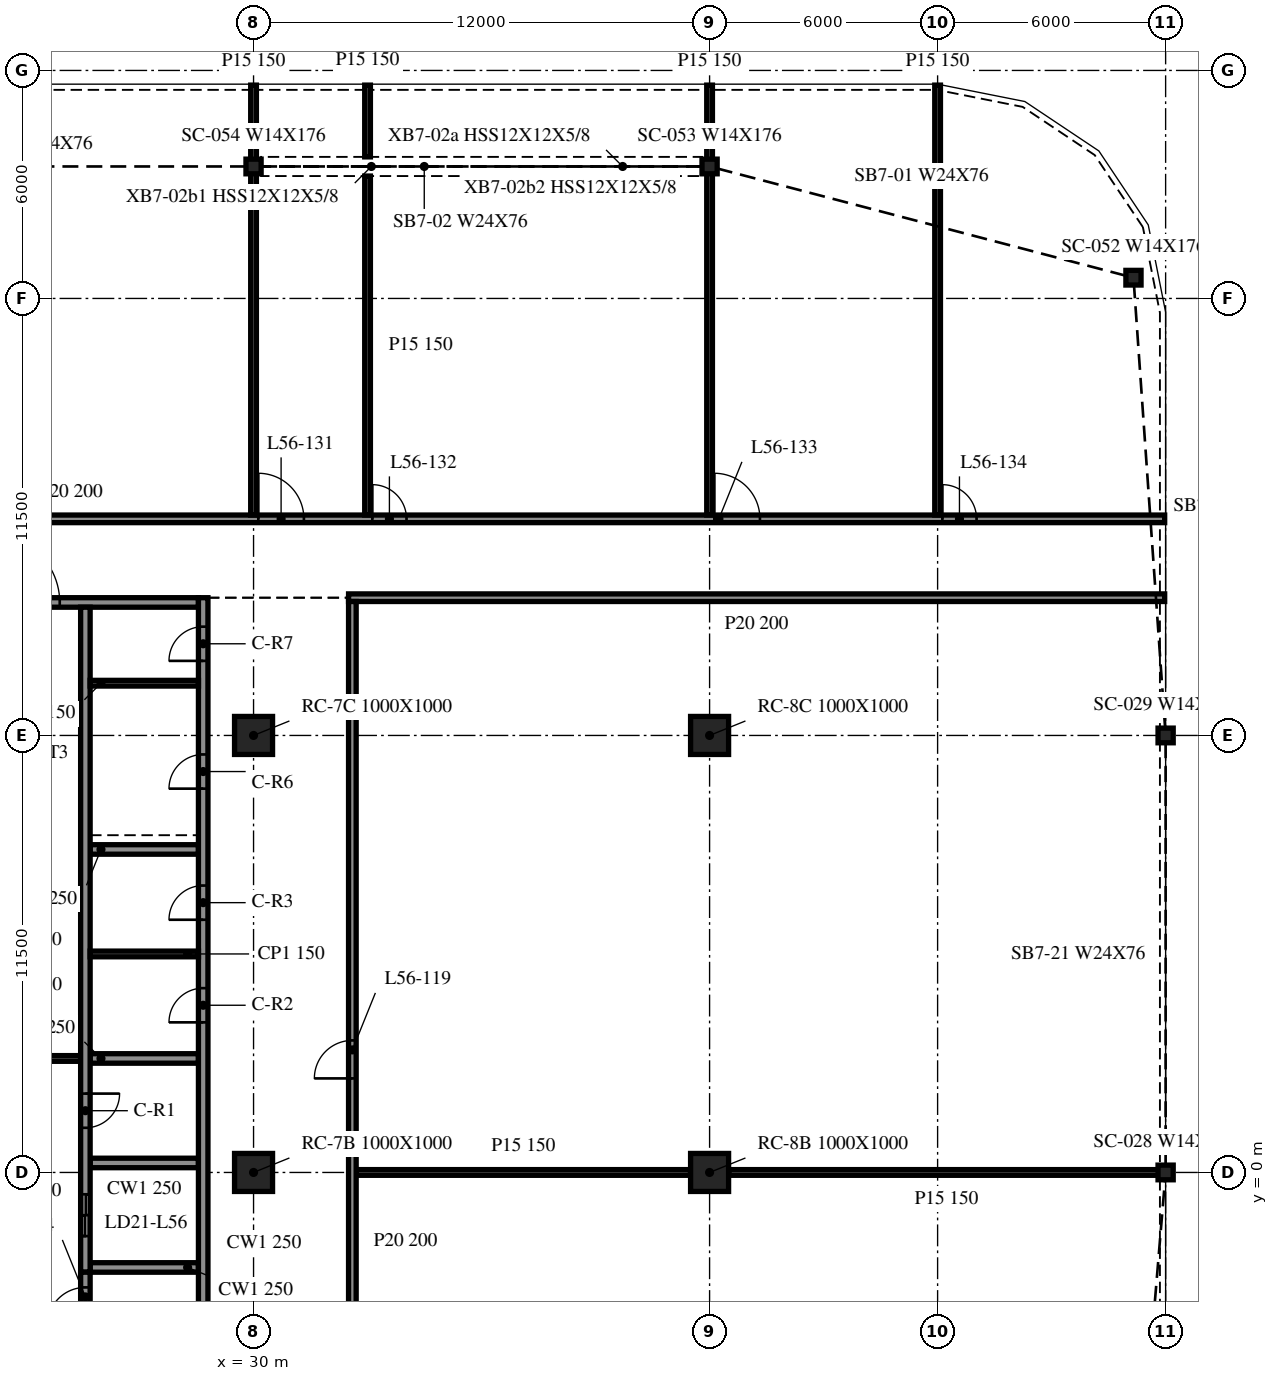
"""IFC4 building model, lengths in metres.
Left out: names, types, materials, properties, quantities, classifications, styles, units other than length and angle.
Written with IfcOpenShell. Run it as: python <this file> out.ifc"""

import sys

from ifc_helpers import new_model, si_unit, direction, frame, frame_2d, origin, origin_2d, place, context, subcontext, project, spatial, rectangle, i_section, extrude, element, fill, save


model = new_model("IFC4")
c1 = context("Model", 3, precision=1e-05, world=origin(), true_north=direction((0.0, 1.0)))
c2 = subcontext(c1, "Body", "Model", "MODEL_VIEW")
j1 = project(units=[si_unit("LENGTHUNIT", "METRE"), si_unit("PLANEANGLEUNIT", "RADIAN")], contexts=[c1])
p1 = place(None, origin())
s1 = spatial("IfcSite", under=j1, at=p1, CompositionType="ELEMENT")
p2 = place(p1, origin())
s2 = spatial("IfcBuilding", under=s1, at=p2, CompositionType="ELEMENT")
p3 = place(p2, frame((0.0, 0.0, 232.4)))
s3 = spatial("IfcBuildingStorey", under=s2, at=p3, CompositionType="ELEMENT", Elevation=232.4)
for number, where, z_axis, x_axis in (
    (1, (30.0, 0.0, -0.34), (0.0, 0.0, 1.0), (1.0, 0.0, 0.0)),
    (2, (30.0, 11.5, -0.34), (0.0, 0.0, 1.0), (1.0, 0.0, 0.0)),
    (3, (42.0, 0.0, -0.34), (0.0, 0.0, 1.0), (1.0, 0.0, 0.0)),
    (4, (42.0, 11.5, -0.34), (0.0, 0.0, 1.0), (1.0, 0.0, 0.0)),
):
    element("IfcColumn", number, at=place(p3, frame(where, z_axis=z_axis, x_axis=x_axis)), inside=s3, PredefinedType="COLUMN", context=c2, shape_type="SweptSolid", body=[
        extrude(rectangle(XDim=1.0, YDim=1.0, at=origin_2d()), origin(), (0.0, 0.0, 1.0), 3.8),
    ])
for number, where, z_axis, x_axis in (
    (5, (53.154, 23.546, -0.34), (0.0, 0.0, 1.0), (1.0, 0.0, 0.0)),
    (6, (42.0, 26.473, -0.34), (0.0, 0.0, 1.0), (1.0, 0.0, 0.0)),
    (7, (30.0, 26.473, -0.34), (0.0, 0.0, 1.0), (1.0, 0.0, 0.0)),
    (8, (54.0, 0.0, -0.34), (0.0, 0.0, 1.0), (1.0, 0.0, 0.0)),
    (9, (54.0, 11.5, -0.34), (0.0, 0.0, 1.0), (1.0, 0.0, 0.0)),
):
    element("IfcColumn", number, at=place(p3, frame(where, z_axis=z_axis, x_axis=x_axis)), inside=s3, PredefinedType="COLUMN", context=c2, shape_type="SweptSolid", body=[
        extrude(i_section(OverallWidth=0.399, OverallDepth=0.386, WebThickness=0.021, FlangeThickness=0.033, at=origin_2d()), origin(), (0.0, 0.0, 1.0), 3.8),
    ])
p4 = place(p3, frame((28.675, -9.125, 0.0), z_axis=(0.0, 0.0, 1.0), x_axis=(0.0, 1.0, 0.0)))
e10 = element("IfcWall", 10, at=p4, inside=s3, PredefinedType="SOLIDWALL", context=c2, shape_type="SweptSolid", body=[
    extrude(rectangle(XDim=24.25, YDim=0.25, at=frame_2d((12.125, 0.0))), origin(), (0.0, 0.0, 1.0), 3.46),
])
p5 = place(p4, frame((13.075, 0.0, 0.0)))
e11 = element("IfcOpeningElement", 11, at=p5, cuts=e10, PredefinedType="OPENING", context=c2, shape_type="SweptSolid", body=[
    extrude(rectangle(XDim=0.9, YDim=2.1, at=frame_2d((0.45, 1.05))), frame((0.0, 0.135, 0.0), z_axis=(0.0, -1.0, 0.0), x_axis=(1.0, 0.0, 0.0)), (0.0, 0.0, 1.0), 0.27),
])
p6 = place(p4, frame((15.775, 0.0, 0.0)))
e12 = element("IfcOpeningElement", 12, at=p6, cuts=e10, PredefinedType="OPENING", context=c2, shape_type="SweptSolid", body=[
    extrude(rectangle(XDim=0.9, YDim=2.1, at=frame_2d((0.45, 1.05))), frame((0.0, 0.135, 0.0), z_axis=(0.0, -1.0, 0.0), x_axis=(1.0, 0.0, 0.0)), (0.0, 0.0, 1.0), 0.27),
])
p7 = place(p4, frame((19.225, 0.0, 0.0)))
e13 = element("IfcOpeningElement", 13, at=p7, cuts=e10, PredefinedType="OPENING", context=c2, shape_type="SweptSolid", body=[
    extrude(rectangle(XDim=0.9, YDim=2.1, at=frame_2d((0.45, 1.05))), frame((0.0, 0.135, 0.0), z_axis=(0.0, -1.0, 0.0), x_axis=(1.0, 0.0, 0.0)), (0.0, 0.0, 1.0), 0.27),
])
p8 = place(p4, frame((22.587, 0.0, 0.0)))
e14 = element("IfcOpeningElement", 14, at=p8, cuts=e10, PredefinedType="OPENING", context=c2, shape_type="SweptSolid", body=[
    extrude(rectangle(XDim=0.9, YDim=2.1, at=frame_2d((0.45, 1.05))), frame((0.0, 0.135, 0.0), z_axis=(0.0, -1.0, 0.0), x_axis=(1.0, 0.0, 0.0)), (0.0, 0.0, 1.0), 0.27),
])
p9 = place(p3, frame((19.45, 15.0, 0.0), z_axis=(0.0, 0.0, 1.0), x_axis=(1.0, 0.0, 0.0)))
e15 = element("IfcWall", 15, at=p9, inside=s3, PredefinedType="SOLIDWALL", context=c2, shape_type="SweptSolid", body=[
    extrude(rectangle(XDim=9.1, YDim=0.25, at=frame_2d((4.55, 0.0))), origin(), (0.0, 0.0, 1.0), 3.46),
])
p10 = place(p9, frame((3.65, 0.0, 0.0)))
e16 = element("IfcOpeningElement", 16, at=p10, cuts=e15, PredefinedType="OPENING", context=c2, shape_type="SweptSolid", body=[
    extrude(rectangle(XDim=1.8, YDim=2.1, at=frame_2d((0.9, 1.05))), frame((0.0, 0.135, 0.0), z_axis=(0.0, -1.0, 0.0), x_axis=(1.0, 0.0, 0.0)), (0.0, 0.0, 1.0), 0.27),
])
p11 = place(p3, frame((25.575, -8.875, 0.0), z_axis=(0.0, 0.0, 1.0), x_axis=(0.0, 1.0, 0.0)))
e17 = element("IfcWall", 17, at=p11, inside=s3, PredefinedType="SOLIDWALL", context=c2, shape_type="SweptSolid", body=[
    extrude(rectangle(XDim=6.25, YDim=0.25, at=frame_2d((3.125, 0.0))), origin(), (0.0, 0.0, 1.0), 3.46),
])
p12 = place(p11, frame((4.85, 0.0, 0.0)))
e18 = element("IfcOpeningElement", 18, at=p12, cuts=e17, PredefinedType="OPENING", context=c2, shape_type="SweptSolid", body=[
    extrude(rectangle(XDim=1.0, YDim=2.1, at=frame_2d((0.5, 1.05))), frame((0.0, 0.135, 0.0), z_axis=(0.0, -1.0, 0.0), x_axis=(1.0, 0.0, 0.0)), (0.0, 0.0, 1.0), 0.27),
])
p13 = place(p3, frame((25.575, 14.875, 0.0), z_axis=(0.0, 0.0, 1.0), x_axis=(0.0, -1.0, 0.0)))
e19 = element("IfcWall", 19, at=p13, inside=s3, PredefinedType="SOLIDWALL", context=c2, shape_type="SweptSolid", body=[
    extrude(rectangle(XDim=17.5, YDim=0.25, at=frame_2d((8.75, 0.0))), origin(), (0.0, 0.0, 1.0), 3.46),
])
p14 = place(p13, frame((15.45, 0.0, 0.0)))
e20 = element("IfcOpeningElement", 20, at=p14, cuts=e19, PredefinedType="OPENING", context=c2, shape_type="SweptSolid", body=[
    extrude(rectangle(XDim=1.1, YDim=2.1, at=frame_2d((0.55, 1.05))), frame((0.0, 0.135, 0.0), z_axis=(0.0, -1.0, 0.0), x_axis=(1.0, 0.0, 0.0)), (0.0, 0.0, 1.0), 0.27),
])
p15 = place(p13, frame((12.8, 0.0, 0.0)))
e21 = element("IfcOpeningElement", 21, at=p15, cuts=e19, PredefinedType="OPENING", context=c2, shape_type="SweptSolid", body=[
    extrude(rectangle(XDim=0.9, YDim=2.1, at=frame_2d((0.45, 1.05))), frame((0.0, 0.135, 0.0), z_axis=(0.0, -1.0, 0.0), x_axis=(1.0, 0.0, 0.0)), (0.0, 0.0, 1.0), 0.27),
])
for number, where, z_axis, x_axis in (
    (22, (25.7, -2.5, 0.0), (0.0, 0.0, 1.0), (1.0, 0.0, 0.0)),
    (23, (25.7, 0.25, 0.0), (0.0, 0.0, 1.0), (1.0, 0.0, 0.0)),
    (24, (25.7, 3.0, 0.0), (0.0, 0.0, 1.0), (1.0, 0.0, 0.0)),
    (25, (25.7, 8.5, 0.0), (0.0, 0.0, 1.0), (1.0, 0.0, 0.0)),
):
    element("IfcWall", number, at=place(p3, frame(where, z_axis=z_axis, x_axis=x_axis)), inside=s3, PredefinedType="SOLIDWALL", context=c2, shape_type="SweptSolid", body=[
        extrude(rectangle(XDim=2.85, YDim=0.25, at=frame_2d((1.425, 0.0))), origin(), (0.0, 0.0, 1.0), 3.46),
    ])
p16 = place(p3, frame((22.55, 3.0, 0.0), z_axis=(0.0, 0.0, 1.0), x_axis=(1.0, 0.0, 0.0)))
e26 = element("IfcWall", 26, at=p16, inside=s3, PredefinedType="PARTITIONING", context=c2, shape_type="SweptSolid", body=[
    extrude(rectangle(XDim=2.9, YDim=0.15, at=frame_2d((1.45, 0.0))), origin(), (0.0, 0.0, 1.0), 3.46),
])
for number, where, z_axis, x_axis in (
    (27, (25.7, 5.75, 0.0), (0.0, 0.0, 1.0), (1.0, 0.0, 0.0)),
    (28, (25.7, 12.875, 0.0), (0.0, 0.0, 1.0), (1.0, 0.0, 0.0)),
):
    element("IfcWall", number, at=place(p3, frame(where, z_axis=z_axis, x_axis=x_axis)), inside=s3, PredefinedType="PARTITIONING", context=c2, shape_type="SweptSolid", body=[
        extrude(rectangle(XDim=2.85, YDim=0.15, at=frame_2d((1.425, 0.0))), origin(), (0.0, 0.0, 1.0), 3.46),
    ])
p17 = place(p3, frame((32.7, 0.0, 0.0), z_axis=(0.0, 0.0, 1.0), x_axis=(1.0, 0.0, 0.0)))
e29 = element("IfcWall", 29, at=p17, inside=s3, PredefinedType="PARTITIONING", context=c2, shape_type="SweptSolid", body=[
    extrude(rectangle(XDim=8.8, YDim=0.15, at=frame_2d((4.4, 0.0))), origin(), (0.0, 0.0, 1.0), 3.46),
])
p18 = place(p3, frame((42.5, 0.0, 0.0), z_axis=(0.0, 0.0, 1.0), x_axis=(1.0, 0.0, 0.0)))
e30 = element("IfcWall", 30, at=p18, inside=s3, PredefinedType="PARTITIONING", context=c2, shape_type="SweptSolid", body=[
    extrude(rectangle(XDim=11.475, YDim=0.15, at=frame_2d((5.738, 0.0))), origin(), (0.0, 0.0, 1.0), 3.46),
])
p19 = place(p3, frame((32.5, 15.125, 0.0), z_axis=(0.0, 0.0, 1.0), x_axis=(1.0, 0.0, 0.0)))
e31 = element("IfcWall", 31, at=p19, inside=s3, PredefinedType="PARTITIONING", context=c2, shape_type="SweptSolid", body=[
    extrude(rectangle(XDim=21.475, YDim=0.2, at=frame_2d((10.738, 0.0))), origin(), (0.0, 0.0, 1.0), 3.46),
])
p20 = place(p3, frame((-41.975, 17.2, 0.0), z_axis=(0.0, 0.0, 1.0), x_axis=(1.0, 0.0, 0.0)))
e32 = element("IfcWall", 32, at=p20, inside=s3, PredefinedType="PARTITIONING", context=c2, shape_type="SweptSolid", body=[
    extrude(rectangle(XDim=95.95, YDim=0.2, at=frame_2d((47.975, 0.0))), origin(), (0.0, 0.0, 1.0), 3.46),
])
p21 = place(p20, frame((10.7, 0.0, 0.0)))
e33 = element("IfcOpeningElement", 33, at=p21, cuts=e32, PredefinedType="OPENING", context=c2, shape_type="SweptSolid", body=[
    extrude(rectangle(XDim=0.9, YDim=2.1, at=frame_2d((0.45, 1.05))), frame((0.0, 0.11, 0.0), z_axis=(0.0, -1.0, 0.0), x_axis=(1.0, 0.0, 0.0)), (0.0, 0.0, 1.0), 0.22),
])
p22 = place(p20, frame((13.3, 0.0, 0.0)))
e34 = element("IfcOpeningElement", 34, at=p22, cuts=e32, PredefinedType="OPENING", context=c2, shape_type="SweptSolid", body=[
    extrude(rectangle(XDim=1.2, YDim=2.1, at=frame_2d((0.6, 1.05))), frame((0.0, 0.11, 0.0), z_axis=(0.0, -1.0, 0.0), x_axis=(1.0, 0.0, 0.0)), (0.0, 0.0, 1.0), 0.22),
])
p23 = place(p20, frame((22.7, 0.0, 0.0)))
e35 = element("IfcOpeningElement", 35, at=p23, cuts=e32, PredefinedType="OPENING", context=c2, shape_type="SweptSolid", body=[
    extrude(rectangle(XDim=0.9, YDim=2.1, at=frame_2d((0.45, 1.05))), frame((0.0, 0.11, 0.0), z_axis=(0.0, -1.0, 0.0), x_axis=(1.0, 0.0, 0.0)), (0.0, 0.0, 1.0), 0.22),
])
p24 = place(p20, frame((28.3, 0.0, 0.0)))
e36 = element("IfcOpeningElement", 36, at=p24, cuts=e32, PredefinedType="OPENING", context=c2, shape_type="SweptSolid", body=[
    extrude(rectangle(XDim=1.2, YDim=2.1, at=frame_2d((0.6, 1.05))), frame((0.0, 0.11, 0.0), z_axis=(0.0, -1.0, 0.0), x_axis=(1.0, 0.0, 0.0)), (0.0, 0.0, 1.0), 0.22),
])
p25 = place(p20, frame((40.3, 0.0, 0.0)))
e37 = element("IfcOpeningElement", 37, at=p25, cuts=e32, PredefinedType="OPENING", context=c2, shape_type="SweptSolid", body=[
    extrude(rectangle(XDim=1.2, YDim=2.1, at=frame_2d((0.6, 1.05))), frame((0.0, 0.11, 0.0), z_axis=(0.0, -1.0, 0.0), x_axis=(1.0, 0.0, 0.0)), (0.0, 0.0, 1.0), 0.22),
])
p26 = place(p20, frame((43.7, 0.0, 0.0)))
e38 = element("IfcOpeningElement", 38, at=p26, cuts=e32, PredefinedType="OPENING", context=c2, shape_type="SweptSolid", body=[
    extrude(rectangle(XDim=0.9, YDim=2.1, at=frame_2d((0.45, 1.05))), frame((0.0, 0.11, 0.0), z_axis=(0.0, -1.0, 0.0), x_axis=(1.0, 0.0, 0.0)), (0.0, 0.0, 1.0), 0.22),
])
p27 = place(p20, frame((47.3, 0.0, 0.0)))
e39 = element("IfcOpeningElement", 39, at=p27, cuts=e32, PredefinedType="OPENING", context=c2, shape_type="SweptSolid", body=[
    extrude(rectangle(XDim=1.2, YDim=2.1, at=frame_2d((0.6, 1.05))), frame((0.0, 0.11, 0.0), z_axis=(0.0, -1.0, 0.0), x_axis=(1.0, 0.0, 0.0)), (0.0, 0.0, 1.0), 0.22),
])
p28 = place(p20, frame((54.1, 0.0, 0.0)))
e40 = element("IfcOpeningElement", 40, at=p28, cuts=e32, PredefinedType="OPENING", context=c2, shape_type="SweptSolid", body=[
    extrude(rectangle(XDim=0.9, YDim=2.1, at=frame_2d((0.45, 1.05))), frame((0.0, 0.11, 0.0), z_axis=(0.0, -1.0, 0.0), x_axis=(1.0, 0.0, 0.0)), (0.0, 0.0, 1.0), 0.22),
])
p29 = place(p20, frame((60.1, 0.0, 0.0)))
e41 = element("IfcOpeningElement", 41, at=p29, cuts=e32, PredefinedType="OPENING", context=c2, shape_type="SweptSolid", body=[
    extrude(rectangle(XDim=1.2, YDim=2.1, at=frame_2d((0.6, 1.05))), frame((0.0, 0.11, 0.0), z_axis=(0.0, -1.0, 0.0), x_axis=(1.0, 0.0, 0.0)), (0.0, 0.0, 1.0), 0.22),
])
p30 = place(p20, frame((72.1, 0.0, 0.0)))
e42 = element("IfcOpeningElement", 42, at=p30, cuts=e32, PredefinedType="OPENING", context=c2, shape_type="SweptSolid", body=[
    extrude(rectangle(XDim=1.2, YDim=2.1, at=frame_2d((0.6, 1.05))), frame((0.0, 0.11, 0.0), z_axis=(0.0, -1.0, 0.0), x_axis=(1.0, 0.0, 0.0)), (0.0, 0.0, 1.0), 0.22),
])
p31 = place(p20, frame((75.1, 0.0, 0.0)))
e43 = element("IfcOpeningElement", 43, at=p31, cuts=e32, PredefinedType="OPENING", context=c2, shape_type="SweptSolid", body=[
    extrude(rectangle(XDim=0.9, YDim=2.1, at=frame_2d((0.45, 1.05))), frame((0.0, 0.11, 0.0), z_axis=(0.0, -1.0, 0.0), x_axis=(1.0, 0.0, 0.0)), (0.0, 0.0, 1.0), 0.22),
])
p32 = place(p20, frame((84.1, 0.0, 0.0)))
e44 = element("IfcOpeningElement", 44, at=p32, cuts=e32, PredefinedType="OPENING", context=c2, shape_type="SweptSolid", body=[
    extrude(rectangle(XDim=1.2, YDim=2.1, at=frame_2d((0.6, 1.05))), frame((0.0, 0.11, 0.0), z_axis=(0.0, -1.0, 0.0), x_axis=(1.0, 0.0, 0.0)), (0.0, 0.0, 1.0), 0.22),
])
p33 = place(p20, frame((90.1, 0.0, 0.0)))
e45 = element("IfcOpeningElement", 45, at=p33, cuts=e32, PredefinedType="OPENING", context=c2, shape_type="SweptSolid", body=[
    extrude(rectangle(XDim=0.9, YDim=2.1, at=frame_2d((0.45, 1.05))), frame((0.0, 0.11, 0.0), z_axis=(0.0, -1.0, 0.0), x_axis=(1.0, 0.0, 0.0)), (0.0, 0.0, 1.0), 0.22),
])
p34 = place(p3, frame((30.0, 17.3, 0.0), z_axis=(0.0, 0.0, 1.0), x_axis=(0.0, 1.0, 0.0)))
e46 = element("IfcWall", 46, at=p34, inside=s3, PredefinedType="PARTITIONING", context=c2, shape_type="SweptSolid", body=[
    extrude(rectangle(XDim=11.314, YDim=0.15, at=frame_2d((5.657, 0.0))), origin(), (0.0, 0.0, 1.0), 3.46),
])
p35 = place(p3, frame((32.6, -9.025, 0.0), z_axis=(0.0, 0.0, 1.0), x_axis=(0.0, 1.0, 0.0)))
e47 = element("IfcWall", 47, at=p35, inside=s3, PredefinedType="PARTITIONING", context=c2, shape_type="SweptSolid", body=[
    extrude(rectangle(XDim=24.05, YDim=0.2, at=frame_2d((12.025, 0.0))), origin(), (0.0, 0.0, 1.0), 3.46),
])
p36 = place(p35, frame((11.5, 0.0, 0.0)))
e48 = element("IfcOpeningElement", 48, at=p36, cuts=e47, PredefinedType="OPENING", context=c2, shape_type="SweptSolid", body=[
    extrude(rectangle(XDim=1.0, YDim=2.1, at=frame_2d((0.5, 1.05))), frame((0.0, 0.11, 0.0), z_axis=(0.0, -1.0, 0.0), x_axis=(1.0, 0.0, 0.0)), (0.0, 0.0, 1.0), 0.22),
])
p37 = place(p3, frame((33.0, 17.3, 0.0), z_axis=(0.0, 0.0, 1.0), x_axis=(0.0, 1.0, 0.0)))
e49 = element("IfcWall", 49, at=p37, inside=s3, PredefinedType="PARTITIONING", context=c2, shape_type="SweptSolid", body=[
    extrude(rectangle(XDim=8.921, YDim=0.15, at=frame_2d((4.46, 0.0))), origin(), (0.0, 0.0, 1.0), 3.46),
])
p38 = place(p3, frame((33.0, 26.725, 0.0), z_axis=(0.0, 0.0, 1.0), x_axis=(0.0, 1.0, 0.0)))
e50 = element("IfcWall", 50, at=p38, inside=s3, PredefinedType="PARTITIONING", context=c2, shape_type="SweptSolid", body=[
    extrude(rectangle(XDim=1.889, YDim=0.15, at=frame_2d((0.944, 0.0))), origin(), (0.0, 0.0, 1.0), 3.46),
])
for number, where, z_axis, x_axis in (
    (51, (42.0, 17.3, 0.0), (0.0, 0.0, 1.0), (0.0, 1.0, 0.0)),
    (52, (48.0, 17.3, 0.0), (0.0, 0.0, 1.0), (0.0, 1.0, 0.0)),
):
    element("IfcWall", number, at=place(p3, frame(where, z_axis=z_axis, x_axis=x_axis)), inside=s3, PredefinedType="PARTITIONING", context=c2, shape_type="SweptSolid", body=[
        extrude(rectangle(XDim=11.314, YDim=0.15, at=frame_2d((5.657, 0.0))), origin(), (0.0, 0.0, 1.0), 3.46),
    ])
p39 = place(p10, origin())
e53 = element("IfcDoor", 53, at=p39, inside=s3, OperationType="DOUBLE_DOOR_SINGLE_SWING", PredefinedType="DOOR", context=c2, shape_type="SweptSolid", body=[
    extrude(rectangle(XDim=1.8, YDim=2.1, at=frame_2d((0.9, 1.05))), frame((0.0, 0.025, 0.0), z_axis=(0.0, -1.0, 0.0), x_axis=(1.0, 0.0, 0.0)), (0.0, 0.0, 1.0), 0.05),
])
fill(e16, e53)
p40 = place(p14, origin())
e54 = element("IfcDoor", 54, at=p40, inside=s3, OperationType="DOUBLE_DOOR_SLIDING", PredefinedType="DOOR", context=c2, shape_type="SweptSolid", body=[
    extrude(rectangle(XDim=1.1, YDim=2.1, at=frame_2d((0.55, 1.05))), frame((0.0, 0.025, 0.0), z_axis=(0.0, -1.0, 0.0), x_axis=(1.0, 0.0, 0.0)), (0.0, 0.0, 1.0), 0.05),
])
fill(e20, e54)
p41 = place(p15, origin())
e55 = element("IfcDoor", 55, at=p41, inside=s3, OperationType="SINGLE_SWING_LEFT", PredefinedType="DOOR", context=c2, shape_type="SweptSolid", body=[
    extrude(rectangle(XDim=0.9, YDim=2.1, at=frame_2d((0.45, 1.05))), frame((0.0, 0.025, 0.0), z_axis=(0.0, -1.0, 0.0), x_axis=(1.0, 0.0, 0.0)), (0.0, 0.0, 1.0), 0.05),
])
fill(e21, e55)
p42 = place(p5, origin())
e56 = element("IfcDoor", 56, at=p42, inside=s3, OperationType="SINGLE_SWING_RIGHT", PredefinedType="DOOR", context=c2, shape_type="SweptSolid", body=[
    extrude(rectangle(XDim=0.9, YDim=2.1, at=frame_2d((0.45, 1.05))), frame((0.0, 0.025, 0.0), z_axis=(0.0, -1.0, 0.0), x_axis=(1.0, 0.0, 0.0)), (0.0, 0.0, 1.0), 0.05),
])
fill(e11, e56)
p43 = place(p6, origin())
e57 = element("IfcDoor", 57, at=p43, inside=s3, OperationType="SINGLE_SWING_LEFT", PredefinedType="DOOR", context=c2, shape_type="SweptSolid", body=[
    extrude(rectangle(XDim=0.9, YDim=2.1, at=frame_2d((0.45, 1.05))), frame((0.0, 0.025, 0.0), z_axis=(0.0, -1.0, 0.0), x_axis=(1.0, 0.0, 0.0)), (0.0, 0.0, 1.0), 0.05),
])
fill(e12, e57)
p44 = place(p7, origin())
e58 = element("IfcDoor", 58, at=p44, inside=s3, OperationType="SINGLE_SWING_RIGHT", PredefinedType="DOOR", context=c2, shape_type="SweptSolid", body=[
    extrude(rectangle(XDim=0.9, YDim=2.1, at=frame_2d((0.45, 1.05))), frame((0.0, 0.025, 0.0), z_axis=(0.0, -1.0, 0.0), x_axis=(1.0, 0.0, 0.0)), (0.0, 0.0, 1.0), 0.05),
])
fill(e13, e58)
p45 = place(p8, origin())
e59 = element("IfcDoor", 59, at=p45, inside=s3, OperationType="SINGLE_SWING_LEFT", PredefinedType="DOOR", context=c2, shape_type="SweptSolid", body=[
    extrude(rectangle(XDim=0.9, YDim=2.1, at=frame_2d((0.45, 1.05))), frame((0.0, 0.025, 0.0), z_axis=(0.0, -1.0, 0.0), x_axis=(1.0, 0.0, 0.0)), (0.0, 0.0, 1.0), 0.05),
])
fill(e14, e59)
p46 = place(p12, origin())
e60 = element("IfcDoor", 60, at=p46, inside=s3, OperationType="SINGLE_SWING_LEFT", PredefinedType="DOOR", context=c2, shape_type="SweptSolid", body=[
    extrude(rectangle(XDim=1.0, YDim=2.1, at=frame_2d((0.5, 1.05))), frame((0.0, 0.025, 0.0), z_axis=(0.0, -1.0, 0.0), x_axis=(1.0, 0.0, 0.0)), (0.0, 0.0, 1.0), 0.05),
])
fill(e18, e60)
p47 = place(p36, origin())
e61 = element("IfcDoor", 61, at=p47, inside=s3, OperationType="SINGLE_SWING_RIGHT", PredefinedType="DOOR", context=c2, shape_type="SweptSolid", body=[
    extrude(rectangle(XDim=1.0, YDim=2.1, at=frame_2d((0.5, 1.05))), frame((0.0, 0.025, 0.0), z_axis=(0.0, -1.0, 0.0), x_axis=(1.0, 0.0, 0.0)), (0.0, 0.0, 1.0), 0.05),
])
fill(e48, e61)
p48 = place(p30, origin())
e62 = element("IfcDoor", 62, at=p48, inside=s3, OperationType="SINGLE_SWING_RIGHT", PredefinedType="DOOR", context=c2, shape_type="SweptSolid", body=[
    extrude(rectangle(XDim=1.2, YDim=2.1, at=frame_2d((0.6, 1.05))), frame((0.0, 0.025, 0.0), z_axis=(0.0, -1.0, 0.0), x_axis=(1.0, 0.0, 0.0)), (0.0, 0.0, 1.0), 0.05),
])
fill(e42, e62)
p49 = place(p31, origin())
e63 = element("IfcDoor", 63, at=p49, inside=s3, OperationType="SINGLE_SWING_RIGHT", PredefinedType="DOOR", context=c2, shape_type="SweptSolid", body=[
    extrude(rectangle(XDim=0.9, YDim=2.1, at=frame_2d((0.45, 1.05))), frame((0.0, 0.025, 0.0), z_axis=(0.0, -1.0, 0.0), x_axis=(1.0, 0.0, 0.0)), (0.0, 0.0, 1.0), 0.05),
])
fill(e43, e63)
p50 = place(p32, origin())
e64 = element("IfcDoor", 64, at=p50, inside=s3, OperationType="SINGLE_SWING_RIGHT", PredefinedType="DOOR", context=c2, shape_type="SweptSolid", body=[
    extrude(rectangle(XDim=1.2, YDim=2.1, at=frame_2d((0.6, 1.05))), frame((0.0, 0.025, 0.0), z_axis=(0.0, -1.0, 0.0), x_axis=(1.0, 0.0, 0.0)), (0.0, 0.0, 1.0), 0.05),
])
fill(e44, e64)
p51 = place(p33, origin())
e65 = element("IfcDoor", 65, at=p51, inside=s3, OperationType="SINGLE_SWING_RIGHT", PredefinedType="DOOR", context=c2, shape_type="SweptSolid", body=[
    extrude(rectangle(XDim=0.9, YDim=2.1, at=frame_2d((0.45, 1.05))), frame((0.0, 0.025, 0.0), z_axis=(0.0, -1.0, 0.0), x_axis=(1.0, 0.0, 0.0)), (0.0, 0.0, 1.0), 0.05),
])
fill(e45, e65)
save(model, sys.argv[1])
